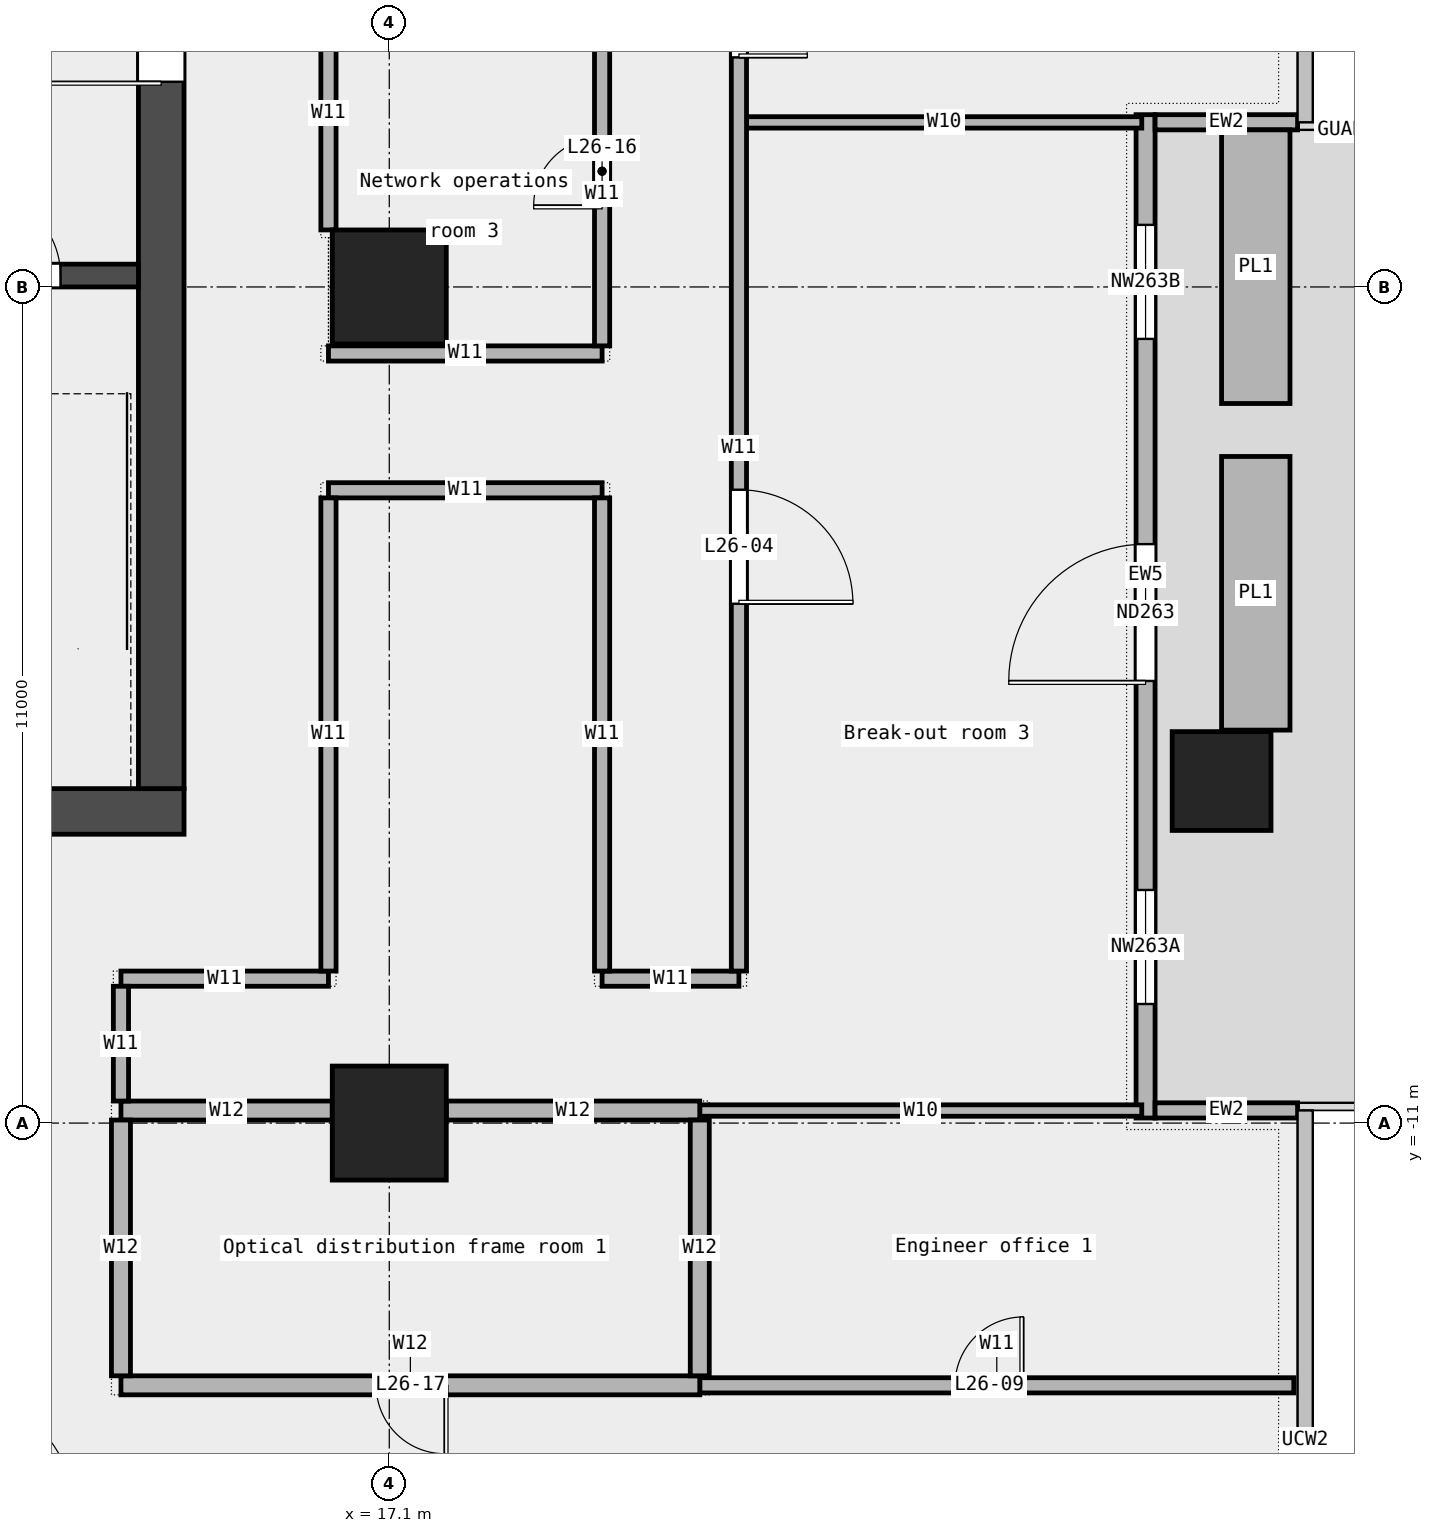
"""IFC4 building model, lengths in metres.
Left out: names, types, materials, properties, quantities, classifications, styles, units other than length and angle.
Written with IfcOpenShell. Run it as: python <this file> out.ifc"""

import sys

from ifc_helpers import new_model, si_unit, direction, frame, frame_2d, origin, origin_2d, place, context, subcontext, project, spatial, rectangle, extrude, element, fill, save


model = new_model("IFC4")
c1 = context("Model", 3, precision=1e-05, world=origin(), true_north=direction((0.0, 1.0)))
c2 = subcontext(c1, "Body", "Model", "MODEL_VIEW")
j1 = project(units=[si_unit("LENGTHUNIT", "METRE"), si_unit("PLANEANGLEUNIT", "RADIAN")], contexts=[c1])
p1 = place(None, origin())
s1 = spatial("IfcSite", under=j1, at=p1, CompositionType="ELEMENT")
p2 = place(p1, origin())
s2 = spatial("IfcBuilding", under=s1, at=p2, CompositionType="ELEMENT")
p3 = place(p2, frame((0.0, 0.0, 130.6)))
s3 = spatial("IfcBuildingStorey", under=s2, at=p3, CompositionType="ELEMENT", Elevation=130.6)
p4 = place(p3, frame((28.05, -6.5, 0.0), z_axis=(0.0, 0.0, 1.0), x_axis=(1.0, 0.0, 0.0)))
e1 = element("IfcColumn", 1, at=p4, inside=s3, PredefinedType="COLUMN", context=c2, shape_type="SweptSolid", body=[
    extrude(rectangle(XDim=1.3, YDim=1.3, at=origin_2d()), origin(), (0.0, 0.0, 1.0), 4.05),
])
for number, where, z_axis, x_axis in (
    (2, (17.1, -11.0, 0.0), (0.0, 0.0, 1.0), (1.0, 0.0, 0.0)),
    (3, (17.1, 0.0, 0.0), (0.0, 0.0, 1.0), (1.0, 0.0, 0.0)),
):
    element("IfcColumn", number, at=place(p3, frame(where, z_axis=z_axis, x_axis=x_axis)), inside=s3, PredefinedType="COLUMN", context=c2, shape_type="SweptSolid", body=[
        extrude(rectangle(XDim=1.5, YDim=1.5, at=origin_2d()), origin(), (0.0, 0.0, 1.0), 4.05),
    ])
p5 = place(p3, frame((27.05, -10.933, 0.0), z_axis=(0.0, 0.0, 1.0), x_axis=(0.0, 1.0, 0.0)))
e4 = element("IfcWall", 4, at=p5, inside=s3, PredefinedType="STANDARD", context=c2, shape_type="SweptSolid", body=[
    extrude(rectangle(XDim=13.2, YDim=0.25, at=frame_2d((6.6, 0.0))), origin(), (0.0, 0.0, 1.0), 4.05),
])
p6 = place(p5, frame((1.5, 0.0, 0.45)))
e5 = element("IfcOpeningElement", 5, at=p6, cuts=e4, PredefinedType="OPENING", context=c2, shape_type="SweptSolid", body=[
    extrude(rectangle(XDim=1.5, YDim=3.0, at=frame_2d((0.75, 1.5))), frame((0.0, 0.137, 0.0), z_axis=(0.0, -1.0, 0.0), x_axis=(1.0, 0.0, 0.0)), (0.0, 0.0, 1.0), 0.274),
])
p7 = place(p5, frame((5.75, 0.0, 0.0)))
e6 = element("IfcOpeningElement", 6, at=p7, cuts=e4, PredefinedType="OPENING", context=c2, shape_type="SweptSolid", body=[
    extrude(rectangle(XDim=1.8, YDim=2.4, at=frame_2d((0.9, 1.2))), frame((0.0, 0.137, 0.0), z_axis=(0.0, -1.0, 0.0), x_axis=(1.0, 0.0, 0.0)), (0.0, 0.0, 1.0), 0.274),
])
p8 = place(p5, frame((10.25, 0.0, 0.45)))
e7 = element("IfcOpeningElement", 7, at=p8, cuts=e4, PredefinedType="OPENING", context=c2, shape_type="SweptSolid", body=[
    extrude(rectangle(XDim=1.5, YDim=3.0, at=frame_2d((0.75, 1.5))), frame((0.0, 0.137, 0.0), z_axis=(0.0, -1.0, 0.0), x_axis=(1.0, 0.0, 0.0)), (0.0, 0.0, 1.0), 0.274),
])
for number, where, z_axis, x_axis in (
    (8, (29.05, -10.833, 0.0), (0.0, 0.0, 1.0), (-1.0, 0.0, 0.0)),
    (9, (29.05, 2.167, 0.0), (0.0, 0.0, 1.0), (-1.0, 0.0, 0.0)),
):
    element("IfcWall", number, at=place(p3, frame(where, z_axis=z_axis, x_axis=x_axis)), inside=s3, PredefinedType="STANDARD", context=c2, shape_type="SweptSolid", body=[
        extrude(rectangle(XDim=1.875, YDim=0.2, at=frame_2d((0.938, 0.0))), origin(), (0.0, 0.0, 1.0), 4.05),
    ])
for number, where, z_axis, x_axis in (
    (10, (28.5, -5.83, 0.0), (0.0, 0.0, 1.0), (0.0, 1.0, 0.0)),
    (11, (28.5, -1.533, 0.0), (0.0, 0.0, 1.0), (0.0, 1.0, 0.0)),
):
    element("IfcWall", number, at=place(p3, frame(where, z_axis=z_axis, x_axis=x_axis)), inside=s3, PredefinedType="STANDARD", context=c2, shape_type="SweptSolid", body=[
        extrude(rectangle(XDim=3.6, YDim=0.9, at=frame_2d((1.8, 0.0))), origin(), (0.0, 0.0, 1.0), 0.7),
    ])
p9 = place(p3, frame((21.185, -14.45, 0.0), z_axis=(0.0, 0.0, 1.0), x_axis=(1.0, 0.0, 0.0)))
e12 = element("IfcWall", 12, at=p9, inside=s3, PredefinedType="PARTITIONING", context=c2, shape_type="SweptSolid", body=[
    extrude(rectangle(XDim=7.815, YDim=0.2, at=frame_2d((3.907, 0.0))), origin(), (0.0, 0.0, 1.0), 4.05),
])
p10 = place(p9, frame((3.357, 0.0, 0.0)))
e13 = element("IfcOpeningElement", 13, at=p10, cuts=e12, PredefinedType="OPENING", context=c2, shape_type="SweptSolid", body=[
    extrude(rectangle(XDim=0.9, YDim=2.1, at=frame_2d((0.45, 1.05))), frame((0.0, 0.112, 0.0), z_axis=(0.0, -1.0, 0.0), x_axis=(1.0, 0.0, 0.0)), (0.0, 0.0, 1.0), 0.224),
])
p11 = place(p3, frame((13.57, -14.45, 0.0), z_axis=(0.0, 0.0, 1.0), x_axis=(1.0, 0.0, 0.0)))
e14 = element("IfcWall", 14, at=p11, inside=s3, PredefinedType="PARTITIONING", context=c2, shape_type="SweptSolid", body=[
    extrude(rectangle(XDim=7.615, YDim=0.25, at=frame_2d((3.808, 0.0))), origin(), (0.0, 0.0, 1.0), 4.05),
])
p12 = place(p11, frame((3.357, 0.0, 0.0)))
e15 = element("IfcOpeningElement", 15, at=p12, cuts=e14, PredefinedType="OPENING", context=c2, shape_type="SweptSolid", body=[
    extrude(rectangle(XDim=0.9, YDim=2.1, at=frame_2d((0.45, 1.05))), frame((0.0, 0.137, 0.0), z_axis=(0.0, -1.0, 0.0), x_axis=(1.0, 0.0, 0.0)), (0.0, 0.0, 1.0), 0.274),
])
p13 = place(p3, frame((21.185, -10.835, 0.0), z_axis=(0.0, 0.0, 1.0), x_axis=(1.0, 0.0, 0.0)))
e16 = element("IfcWall", 16, at=p13, inside=s3, PredefinedType="PARTITIONING", context=c2, shape_type="SweptSolid", body=[
    extrude(rectangle(XDim=5.815, YDim=0.15, at=frame_2d((2.907, 0.0))), origin(), (0.0, 0.0, 1.0), 4.05),
])
p14 = place(p3, frame((13.57, -10.835, 0.0), z_axis=(0.0, 0.0, 1.0), x_axis=(1.0, 0.0, 0.0)))
e17 = element("IfcWall", 17, at=p14, inside=s3, PredefinedType="PARTITIONING", context=c2, shape_type="SweptSolid", body=[
    extrude(rectangle(XDim=2.78, YDim=0.25, at=frame_2d((1.39, 0.0))), origin(), (0.0, 0.0, 1.0), 4.05),
])
p15 = place(p3, frame((17.85, -10.835, 0.0), z_axis=(0.0, 0.0, 1.0), x_axis=(1.0, 0.0, 0.0)))
e18 = element("IfcWall", 18, at=p15, inside=s3, PredefinedType="PARTITIONING", context=c2, shape_type="SweptSolid", body=[
    extrude(rectangle(XDim=3.335, YDim=0.25, at=frame_2d((1.667, 0.0))), origin(), (0.0, 0.0, 1.0), 4.05),
])
p16 = place(p3, frame((13.57, -9.1, 0.0), z_axis=(0.0, 0.0, 1.0), x_axis=(1.0, 0.0, 0.0)))
e19 = element("IfcWall", 19, at=p16, inside=s3, PredefinedType="PARTITIONING", context=c2, shape_type="SweptSolid", body=[
    extrude(rectangle(XDim=2.73, YDim=0.2, at=frame_2d((1.365, 0.0))), origin(), (0.0, 0.0, 1.0), 4.05),
])
p17 = place(p3, frame((19.9, -9.1, 0.0), z_axis=(0.0, 0.0, 1.0), x_axis=(1.0, 0.0, 0.0)))
e20 = element("IfcWall", 20, at=p17, inside=s3, PredefinedType="PARTITIONING", context=c2, shape_type="SweptSolid", body=[
    extrude(rectangle(XDim=1.8, YDim=0.2, at=frame_2d((0.9, 0.0))), origin(), (0.0, 0.0, 1.0), 4.05),
])
for number, where, z_axis, x_axis in (
    (21, (16.3, -2.675, 0.0), (0.0, 0.0, 1.0), (1.0, 0.0, 0.0)),
    (22, (16.3, -0.875, 0.0), (0.0, 0.0, 1.0), (1.0, 0.0, 0.0)),
):
    element("IfcWall", number, at=place(p3, frame(where, z_axis=z_axis, x_axis=x_axis)), inside=s3, PredefinedType="PARTITIONING", context=c2, shape_type="SweptSolid", body=[
        extrude(rectangle(XDim=3.6, YDim=0.2, at=frame_2d((1.8, 0.0))), origin(), (0.0, 0.0, 1.0), 4.05),
    ])
p18 = place(p3, frame((21.8, 2.165, 0.0), z_axis=(0.0, 0.0, 1.0), x_axis=(1.0, 0.0, 0.0)))
e23 = element("IfcWall", 23, at=p18, inside=s3, PredefinedType="PARTITIONING", context=c2, shape_type="SweptSolid", body=[
    extrude(rectangle(XDim=5.2, YDim=0.15, at=frame_2d((2.6, 0.0))), origin(), (0.0, 0.0, 1.0), 4.05),
])
p19 = place(p3, frame((13.57, -10.71, 0.0), z_axis=(0.0, 0.0, 1.0), x_axis=(0.0, 1.0, 0.0)))
e24 = element("IfcWall", 24, at=p19, inside=s3, PredefinedType="PARTITIONING", context=c2, shape_type="SweptSolid", body=[
    extrude(rectangle(XDim=1.51, YDim=0.2, at=frame_2d((0.755, 0.0))), origin(), (0.0, 0.0, 1.0), 4.05),
])
p20 = place(p3, frame((13.57, -14.325, 0.0), z_axis=(0.0, 0.0, 1.0), x_axis=(0.0, 1.0, 0.0)))
e25 = element("IfcWall", 25, at=p20, inside=s3, PredefinedType="PARTITIONING", context=c2, shape_type="SweptSolid", body=[
    extrude(rectangle(XDim=3.365, YDim=0.25, at=frame_2d((1.683, 0.0))), origin(), (0.0, 0.0, 1.0), 4.05),
])
p21 = place(p3, frame((16.3, -9.0, 0.0), z_axis=(0.0, 0.0, 1.0), x_axis=(0.0, 1.0, 0.0)))
e26 = element("IfcWall", 26, at=p21, inside=s3, PredefinedType="PARTITIONING", context=c2, shape_type="SweptSolid", body=[
    extrude(rectangle(XDim=6.225, YDim=0.2, at=frame_2d((3.113, 0.0))), origin(), (0.0, 0.0, 1.0), 4.05),
])
p22 = place(p3, frame((16.3, 0.75, 0.0), z_axis=(0.0, 0.0, 1.0), x_axis=(0.0, 1.0, 0.0)))
e27 = element("IfcWall", 27, at=p22, inside=s3, PredefinedType="PARTITIONING", context=c2, shape_type="SweptSolid", body=[
    extrude(rectangle(XDim=3.07, YDim=0.2, at=frame_2d((1.535, 0.0))), origin(), (0.0, 0.0, 1.0), 4.05),
])
p23 = place(p3, frame((19.9, -9.0, 0.0), z_axis=(0.0, 0.0, 1.0), x_axis=(0.0, 1.0, 0.0)))
e28 = element("IfcWall", 28, at=p23, inside=s3, PredefinedType="PARTITIONING", context=c2, shape_type="SweptSolid", body=[
    extrude(rectangle(XDim=6.225, YDim=0.2, at=frame_2d((3.113, 0.0))), origin(), (0.0, 0.0, 1.0), 4.05),
])
p24 = place(p3, frame((19.9, -0.775, 0.0), z_axis=(0.0, 0.0, 1.0), x_axis=(0.0, 1.0, 0.0)))
e29 = element("IfcWall", 29, at=p24, inside=s3, PredefinedType="PARTITIONING", context=c2, shape_type="SweptSolid", body=[
    extrude(rectangle(XDim=4.595, YDim=0.2, at=frame_2d((2.297, 0.0))), origin(), (0.0, 0.0, 1.0), 4.05),
])
p25 = place(p24, frame((1.847, 0.0, 0.0)))
e30 = element("IfcOpeningElement", 30, at=p25, cuts=e29, PredefinedType="OPENING", context=c2, shape_type="SweptSolid", body=[
    extrude(rectangle(XDim=0.9, YDim=2.1, at=frame_2d((0.45, 1.05))), frame((0.0, 0.112, 0.0), z_axis=(0.0, -1.0, 0.0), x_axis=(1.0, 0.0, 0.0)), (0.0, 0.0, 1.0), 0.224),
])
p26 = place(p3, frame((21.185, -14.325, 0.0), z_axis=(0.0, 0.0, 1.0), x_axis=(0.0, 1.0, 0.0)))
e31 = element("IfcWall", 31, at=p26, inside=s3, PredefinedType="PARTITIONING", context=c2, shape_type="SweptSolid", body=[
    extrude(rectangle(XDim=3.365, YDim=0.25, at=frame_2d((1.683, 0.0))), origin(), (0.0, 0.0, 1.0), 4.05),
])
p27 = place(p3, frame((21.7, -9.0, 0.0), z_axis=(0.0, 0.0, 1.0), x_axis=(0.0, 1.0, 0.0)))
e32 = element("IfcWall", 32, at=p27, inside=s3, PredefinedType="PARTITIONING", context=c2, shape_type="SweptSolid", body=[
    extrude(rectangle(XDim=13.775, YDim=0.2, at=frame_2d((6.887, 0.0))), origin(), (0.0, 0.0, 1.0), 4.05),
])
p28 = place(p27, frame((4.833, 0.0, 0.0)))
e33 = element("IfcOpeningElement", 33, at=p28, cuts=e32, PredefinedType="OPENING", context=c2, shape_type="SweptSolid", body=[
    extrude(rectangle(XDim=1.5, YDim=2.1, at=frame_2d((0.75, 1.05))), frame((0.0, 0.112, 0.0), z_axis=(0.0, -1.0, 0.0), x_axis=(1.0, 0.0, 0.0)), (0.0, 0.0, 1.0), 0.224),
])
p29 = place(p27, frame((12.02, 0.0, 0.0)))
e34 = element("IfcOpeningElement", 34, at=p29, cuts=e32, PredefinedType="OPENING", context=c2, shape_type="SweptSolid", body=[
    extrude(rectangle(XDim=0.9, YDim=2.1, at=frame_2d((0.45, 1.05))), frame((0.0, 0.112, 0.0), z_axis=(0.0, -1.0, 0.0), x_axis=(1.0, 0.0, 0.0)), (0.0, 0.0, 1.0), 0.224),
])
p30 = place(p3, frame((-14.4, -6.9, 0.0), z_axis=(0.0, 0.0, 1.0), x_axis=(1.0, 0.0, 0.0)))
e35 = element("IfcWall", 35, at=p30, inside=s3, PredefinedType="SHEAR", context=c2, shape_type="SweptSolid", body=[
    extrude(rectangle(XDim=28.8, YDim=0.6, at=frame_2d((14.4, 0.0))), origin(), (0.0, 0.0, 1.0), 4.2),
])
p31 = place(p30, frame((4.9, 0.0, 0.0)))
e36 = element("IfcOpeningElement", 36, at=p31, cuts=e35, PredefinedType="OPENING", context=c2, shape_type="SweptSolid", body=[
    extrude(rectangle(XDim=1.0, YDim=2.1, at=frame_2d((0.5, 1.05))), frame((0.0, 0.312, 0.0), z_axis=(0.0, -1.0, 0.0), x_axis=(1.0, 0.0, 0.0)), (0.0, 0.0, 1.0), 0.624),
])
p32 = place(p30, frame((9.675, 0.0, 0.0)))
e37 = element("IfcOpeningElement", 37, at=p32, cuts=e35, PredefinedType="OPENING", context=c2, shape_type="SweptSolid", body=[
    extrude(rectangle(XDim=1.2, YDim=2.1, at=frame_2d((0.6, 1.05))), frame((0.0, 0.312, 0.0), z_axis=(0.0, -1.0, 0.0), x_axis=(1.0, 0.0, 0.0)), (0.0, 0.0, 1.0), 0.624),
])
p33 = place(p30, frame((14.837, 0.0, 0.0)))
e38 = element("IfcOpeningElement", 38, at=p33, cuts=e35, PredefinedType="OPENING", context=c2, shape_type="SweptSolid", body=[
    extrude(rectangle(XDim=1.0, YDim=2.1, at=frame_2d((0.5, 1.05))), frame((0.0, 0.312, 0.0), z_axis=(0.0, -1.0, 0.0), x_axis=(1.0, 0.0, 0.0)), (0.0, 0.0, 1.0), 0.624),
])
p34 = place(p30, frame((18.75, 0.0, 0.0)))
e39 = element("IfcOpeningElement", 39, at=p34, cuts=e35, PredefinedType="OPENING", context=c2, shape_type="SweptSolid", body=[
    extrude(rectangle(XDim=1.8, YDim=2.1, at=frame_2d((0.9, 1.05))), frame((0.0, 0.312, 0.0), z_axis=(0.0, -1.0, 0.0), x_axis=(1.0, 0.0, 0.0)), (0.0, 0.0, 1.0), 0.624),
])
p35 = place(p30, frame((23.087, 0.0, 0.0)))
e40 = element("IfcOpeningElement", 40, at=p35, cuts=e35, PredefinedType="OPENING", context=c2, shape_type="SweptSolid", body=[
    extrude(rectangle(XDim=1.0, YDim=2.1, at=frame_2d((0.5, 1.05))), frame((0.0, 0.312, 0.0), z_axis=(0.0, -1.0, 0.0), x_axis=(1.0, 0.0, 0.0)), (0.0, 0.0, 1.0), 0.624),
])
p36 = place(p3, frame((14.1, -6.6, 0.0), z_axis=(0.0, 0.0, 1.0), x_axis=(0.0, 1.0, 0.0)))
e41 = element("IfcWall", 41, at=p36, inside=s3, PredefinedType="SHEAR", context=c2, shape_type="SweptSolid", body=[
    extrude(rectangle(XDim=19.5, YDim=0.6, at=frame_2d((9.75, 0.0))), origin(), (0.0, 0.0, 1.0), 4.2),
])
p37 = place(p36, frame((9.3, 0.0, 0.0)))
e42 = element("IfcOpeningElement", 42, at=p37, cuts=e41, PredefinedType="OPENING", context=c2, shape_type="SweptSolid", body=[
    extrude(rectangle(XDim=1.8, YDim=2.1, at=frame_2d((0.9, 1.05))), frame((0.0, 0.312, 0.0), z_axis=(0.0, -1.0, 0.0), x_axis=(1.0, 0.0, 0.0)), (0.0, 0.0, 1.0), 0.624),
])
p38 = place(p3, frame((10.65, 0.15, 0.0), z_axis=(0.0, 0.0, 1.0), x_axis=(1.0, 0.0, 0.0)))
e43 = element("IfcWall", 43, at=p38, inside=s3, PredefinedType="SOLIDWALL", context=c2, shape_type="SweptSolid", body=[
    extrude(rectangle(XDim=3.15, YDim=0.3, at=frame_2d((1.575, 0.0))), origin(), (0.0, 0.0, 1.0), 4.2),
])
p39 = place(p38, frame((1.025, 0.0, 0.0)))
e44 = element("IfcOpeningElement", 44, at=p39, cuts=e43, PredefinedType="OPENING", context=c2, shape_type="SweptSolid", body=[
    extrude(rectangle(XDim=1.1, YDim=2.1, at=frame_2d((0.55, 1.05))), frame((0.0, 0.162, 0.0), z_axis=(0.0, -1.0, 0.0), x_axis=(1.0, 0.0, 0.0)), (0.0, 0.0, 1.0), 0.324),
])
p40 = place(p6, origin())
e45 = element("IfcWindow", 45, at=p40, inside=s3, PartitioningType="SINGLE_PANEL", PredefinedType="WINDOW", context=c2, shape_type="SweptSolid", body=[
    extrude(rectangle(XDim=1.5, YDim=3.0, at=frame_2d((0.75, 1.5))), frame((0.0, 0.03, 0.0), z_axis=(0.0, -1.0, 0.0), x_axis=(1.0, 0.0, 0.0)), (0.0, 0.0, 1.0), 0.06),
])
fill(e5, e45)
p41 = place(p7, origin())
e46 = element("IfcDoor", 46, at=p41, inside=s3, OperationType="DOUBLE_DOOR_SINGLE_SWING", PredefinedType="DOOR", context=c2, shape_type="SweptSolid", body=[
    extrude(rectangle(XDim=1.8, YDim=2.4, at=frame_2d((0.9, 1.2))), frame((0.0, 0.025, 0.0), z_axis=(0.0, -1.0, 0.0), x_axis=(1.0, 0.0, 0.0)), (0.0, 0.0, 1.0), 0.05),
])
fill(e6, e46)
p42 = place(p8, origin())
e47 = element("IfcWindow", 47, at=p42, inside=s3, PartitioningType="SINGLE_PANEL", PredefinedType="WINDOW", context=c2, shape_type="SweptSolid", body=[
    extrude(rectangle(XDim=1.5, YDim=3.0, at=frame_2d((0.75, 1.5))), frame((0.0, 0.03, 0.0), z_axis=(0.0, -1.0, 0.0), x_axis=(1.0, 0.0, 0.0)), (0.0, 0.0, 1.0), 0.06),
])
fill(e7, e47)
p43 = place(p28, origin())
e48 = element("IfcDoor", 48, at=p43, inside=s3, OperationType="DOUBLE_DOOR_SINGLE_SWING", PredefinedType="DOOR", context=c2, shape_type="SweptSolid", body=[
    extrude(rectangle(XDim=1.5, YDim=2.1, at=frame_2d((0.75, 1.05))), frame((0.0, 0.025, 0.0), z_axis=(0.0, -1.0, 0.0), x_axis=(1.0, 0.0, 0.0)), (0.0, 0.0, 1.0), 0.05),
])
fill(e33, e48)
p44 = place(p10, origin())
e49 = element("IfcDoor", 49, at=p44, inside=s3, OperationType="SINGLE_SWING_RIGHT", PredefinedType="DOOR", context=c2, shape_type="SweptSolid", body=[
    extrude(rectangle(XDim=0.9, YDim=2.1, at=frame_2d((0.45, 1.05))), frame((0.0, 0.025, 0.0), z_axis=(0.0, -1.0, 0.0), x_axis=(1.0, 0.0, 0.0)), (0.0, 0.0, 1.0), 0.05),
])
fill(e13, e49)
p45 = place(p25, origin())
e50 = element("IfcDoor", 50, at=p45, inside=s3, OperationType="SINGLE_SWING_LEFT", PredefinedType="DOOR", context=c2, shape_type="SweptSolid", body=[
    extrude(rectangle(XDim=0.9, YDim=2.1, at=frame_2d((0.45, 1.05))), frame((0.0, 0.025, 0.0), z_axis=(0.0, -1.0, 0.0), x_axis=(1.0, 0.0, 0.0)), (0.0, 0.0, 1.0), 0.05),
])
fill(e30, e50)
p46 = place(p12, origin())
e51 = element("IfcDoor", 51, at=p46, inside=s3, OperationType="SINGLE_SWING_LEFT", PredefinedType="DOOR", context=c2, shape_type="SweptSolid", body=[
    extrude(rectangle(XDim=0.9, YDim=2.1, at=frame_2d((0.45, 1.05))), frame((0.0, 0.025, 0.0), z_axis=(0.0, -1.0, 0.0), x_axis=(1.0, 0.0, 0.0)), (0.0, 0.0, 1.0), 0.05),
])
fill(e15, e51)
p47 = place(p29, origin())
e52 = element("IfcDoor", 52, at=p47, inside=s3, OperationType="SINGLE_SWING_RIGHT", PredefinedType="DOOR", context=c2, shape_type="SweptSolid", body=[
    extrude(rectangle(XDim=0.9, YDim=2.1, at=frame_2d((0.45, 1.05))), frame((0.0, 0.025, 0.0), z_axis=(0.0, -1.0, 0.0), x_axis=(1.0, 0.0, 0.0)), (0.0, 0.0, 1.0), 0.05),
])
fill(e34, e52)
p48 = place(p39, origin())
e53 = element("IfcDoor", 53, at=p48, inside=s3, OperationType="SINGLE_SWING_RIGHT", PredefinedType="DOOR", context=c2, shape_type="SweptSolid", body=[
    extrude(rectangle(XDim=1.1, YDim=2.1, at=frame_2d((0.55, 1.05))), frame((0.0, 0.025, 0.0), z_axis=(0.0, -1.0, 0.0), x_axis=(1.0, 0.0, 0.0)), (0.0, 0.0, 1.0), 0.05),
])
fill(e44, e53)
p49 = place(p37, origin())
e54 = element("IfcDoor", 54, at=p49, inside=s3, OperationType="DOUBLE_DOOR_SINGLE_SWING", PredefinedType="DOOR", context=c2, shape_type="SweptSolid", body=[
    extrude(rectangle(XDim=1.8, YDim=2.1, at=frame_2d((0.9, 1.05))), frame((0.0, 0.025, 0.0), z_axis=(0.0, -1.0, 0.0), x_axis=(1.0, 0.0, 0.0)), (0.0, 0.0, 1.0), 0.05),
])
fill(e42, e54)
save(model, sys.argv[1])
